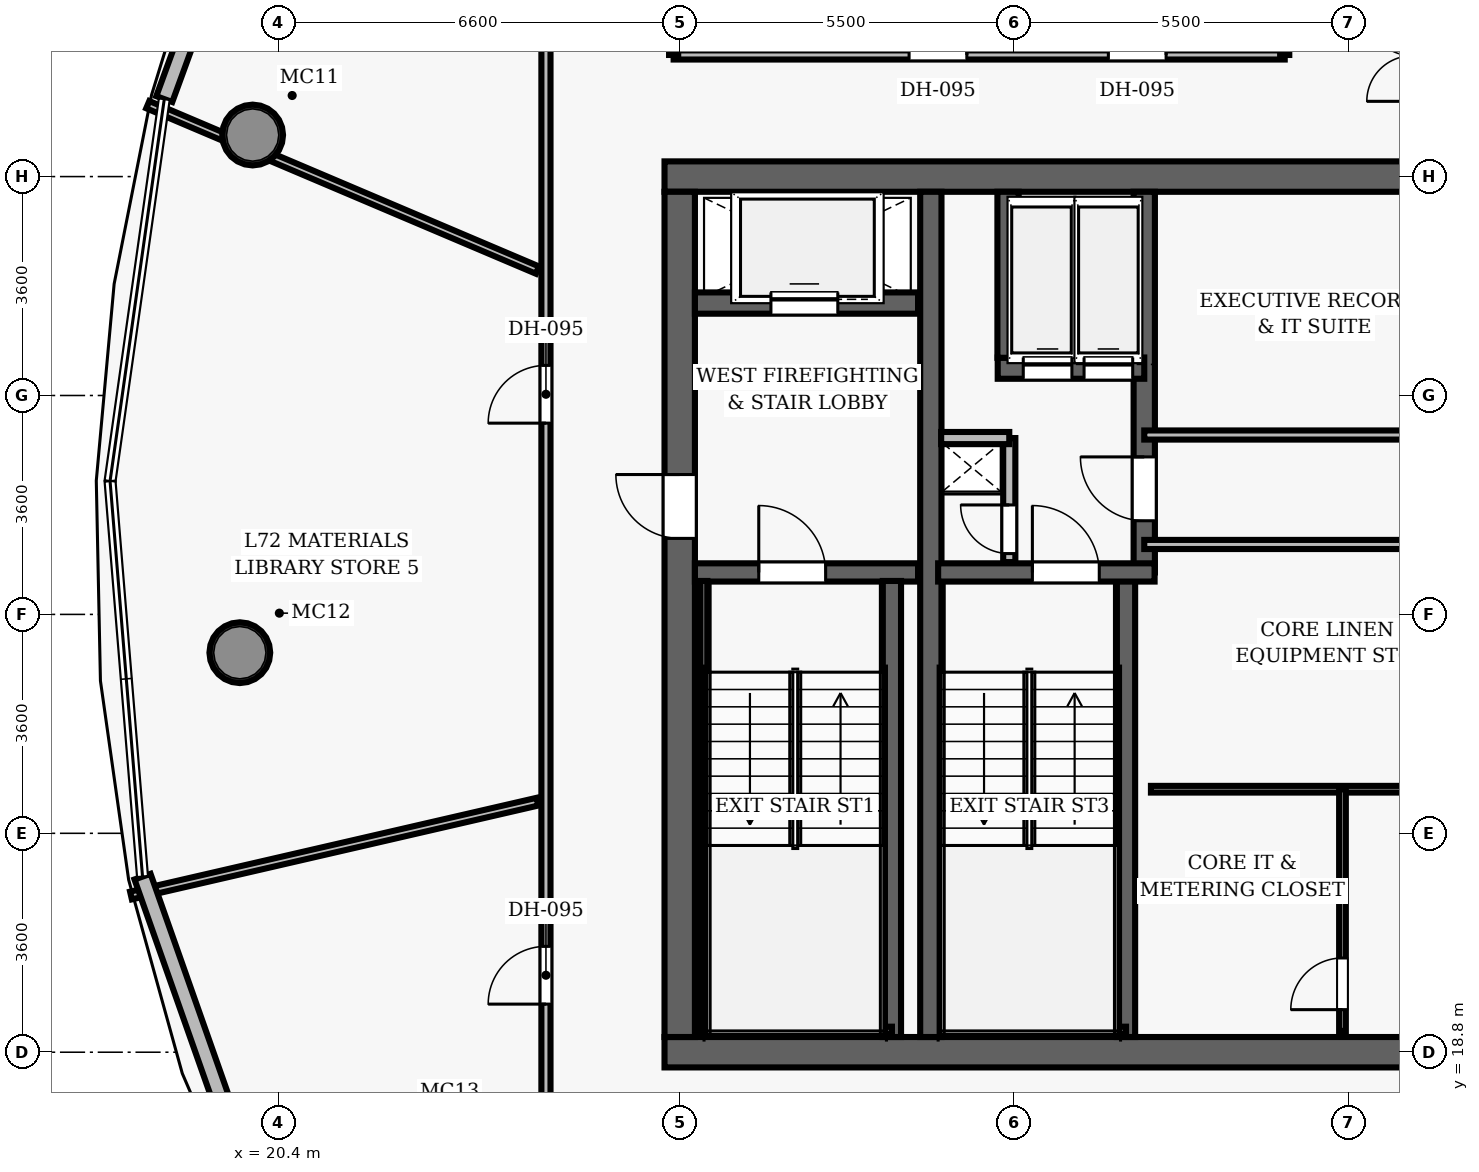
"""IFC4 building model, lengths in metres.
Left out: names, types, materials, properties, quantities, classifications, styles, units other than length and angle.
Written with IfcOpenShell. Run it as: python <this file> out.ifc"""

import sys

from ifc_helpers import new_model, si_unit, direction, frame, frame_2d, origin, origin_2d, place, context, subcontext, project, spatial, rectangle, hollow_circle, extrude, element, fill, save


model = new_model("IFC4")
c1 = context("Model", 3, precision=1e-05, world=origin(), true_north=direction((0.0, 1.0)))
c2 = subcontext(c1, "Body", "Model", "MODEL_VIEW")
j1 = project(units=[si_unit("LENGTHUNIT", "METRE"), si_unit("PLANEANGLEUNIT", "RADIAN")], contexts=[c1])
p1 = place(None, origin())
s1 = spatial("IfcSite", under=j1, at=p1, CompositionType="ELEMENT")
p2 = place(p1, origin())
s2 = spatial("IfcBuilding", under=s1, at=p2, CompositionType="ELEMENT")
p3 = place(p2, frame((0.0, 0.0, 284.4)))
s3 = spatial("IfcBuildingStorey", under=s2, at=p3, CompositionType="ELEMENT", Elevation=284.4)
p4 = place(p3, frame((26.75, 18.8, 0.0), z_axis=(0.0, 0.0, 1.0), x_axis=(1.0, 0.0, 0.0)))
e1 = element("IfcWall", 1, at=p4, inside=s3, PredefinedType="SHEAR", context=c2, shape_type="SweptSolid", body=[
    extrude(rectangle(XDim=22.5, YDim=0.5, at=frame_2d((11.25, 0.0))), origin(), (0.0, 0.0, 1.0), 3.85),
])
p5 = place(p4, frame((14.47, 0.0, 0.0)))
e2 = element("IfcOpeningElement", 2, at=p5, cuts=e1, PredefinedType="OPENING", context=c2, shape_type="SweptSolid", body=[
    extrude(rectangle(XDim=1.05, YDim=2.15, at=frame_2d((0.525, 1.075))), frame((0.0, 0.26, 0.0), z_axis=(0.0, -1.0, 0.0), x_axis=(1.0, 0.0, 0.0)), (0.0, 0.0, 1.0), 0.52),
])
p6 = place(p3, frame((26.75, 33.2, 0.0), z_axis=(0.0, 0.0, 1.0), x_axis=(1.0, 0.0, 0.0)))
e3 = element("IfcWall", 3, at=p6, inside=s3, PredefinedType="SHEAR", context=c2, shape_type="SweptSolid", body=[
    extrude(rectangle(XDim=22.5, YDim=0.5, at=frame_2d((11.25, 0.0))), origin(), (0.0, 0.0, 1.0), 3.85),
])
p7 = place(p3, frame((27.0, 19.05, 0.0), z_axis=(0.0, 0.0, 1.0), x_axis=(0.0, 1.0, 0.0)))
e4 = element("IfcWall", 4, at=p7, inside=s3, PredefinedType="SHEAR", context=c2, shape_type="SweptSolid", body=[
    extrude(rectangle(XDim=13.9, YDim=0.5, at=frame_2d((6.95, 0.0))), origin(), (0.0, 0.0, 1.0), 3.85),
])
p8 = place(p7, frame((8.2, 0.0, 0.0)))
e5 = element("IfcOpeningElement", 5, at=p8, cuts=e4, PredefinedType="OPENING", context=c2, shape_type="SweptSolid", body=[
    extrude(rectangle(XDim=1.05, YDim=2.15, at=frame_2d((0.525, 1.075))), frame((0.0, 0.26, 0.0), z_axis=(0.0, -1.0, 0.0), x_axis=(1.0, 0.0, 0.0)), (0.0, 0.0, 1.0), 0.52),
])
p9 = place(p3, frame((31.13, 19.05, 0.0), z_axis=(0.0, 0.0, 1.0), x_axis=(0.0, 1.0, 0.0)))
e6 = element("IfcWall", 6, at=p9, inside=s3, PredefinedType="SHEAR", context=c2, shape_type="SweptSolid", body=[
    extrude(rectangle(XDim=13.9, YDim=0.35, at=frame_2d((6.95, 0.0))), origin(), (0.0, 0.0, 1.0), 3.85),
])
for number, where, z_axis, x_axis in (
    (7, (19.976, 33.884, 0.0), (0.0, 0.0, 1.0), (1.0, 0.0, 0.0)),
    (8, (19.765, 25.371, 0.0), (0.0, 0.0, 1.0), (1.0, 0.0, 0.0)),
):
    element("IfcColumn", number, at=place(p3, frame(where, z_axis=z_axis, x_axis=x_axis)), inside=s3, PredefinedType="COLUMN", context=c2, shape_type="SweptSolid", body=[
        extrude(hollow_circle(Radius=0.5, WallThickness=0.045, at=origin_2d()), origin(), (0.0, 0.0, 1.0), 3.85),
    ])
p10 = place(p3, frame((27.25, 26.69, 0.0), z_axis=(0.0, 0.0, 1.0), x_axis=(1.0, 0.0, 0.0)))
e9 = element("IfcWall", 9, at=p10, inside=s3, PredefinedType="SHEAR", context=c2, shape_type="SweptSolid", body=[
    extrude(rectangle(XDim=3.67, YDim=0.3, at=frame_2d((1.835, 0.0))), origin(), (0.0, 0.0, 1.0), 3.85),
])
p11 = place(p10, frame((1.05, 0.0, 0.0)))
e10 = element("IfcOpeningElement", 10, at=p11, cuts=e9, PredefinedType="OPENING", context=c2, shape_type="SweptSolid", body=[
    extrude(rectangle(XDim=1.1, YDim=2.15, at=frame_2d((0.55, 1.075))), frame((0.0, 0.16, 0.0), z_axis=(0.0, -1.0, 0.0), x_axis=(1.0, 0.0, 0.0)), (0.0, 0.0, 1.0), 0.32),
])
p12 = place(p3, frame((30.49, 19.05, 0.0), z_axis=(0.0, 0.0, 1.0), x_axis=(0.0, 1.0, 0.0)))
e11 = element("IfcWall", 11, at=p12, inside=s3, PredefinedType="SHEAR", context=c2, shape_type="SweptSolid", body=[
    extrude(rectangle(XDim=7.5, YDim=0.3, at=frame_2d((3.75, 0.0))), origin(), (0.0, 0.0, 1.0), 3.85),
])
p13 = place(p3, frame((27.395, 19.1, 0.0), z_axis=(0.0, 0.0, 1.0), x_axis=(0.0, 1.0, 0.0)))
e12 = element("IfcWall", 12, at=p13, inside=s3, PredefinedType="SHEAR", context=c2, shape_type="SweptSolid", body=[
    extrude(rectangle(XDim=7.45, YDim=0.12, at=frame_2d((3.725, 0.0))), origin(), (0.0, 0.0, 1.0), 3.85),
])
p14 = place(p3, frame((27.395, 19.16, 0.0), z_axis=(0.0, 0.0, 1.0), x_axis=(1.0, 0.0, 0.0)))
e13 = element("IfcWall", 13, at=p14, inside=s3, PredefinedType="SHEAR", context=c2, shape_type="SweptSolid", body=[
    extrude(rectangle(XDim=3.095, YDim=0.12, at=frame_2d((1.547, 0.0))), origin(), (0.0, 0.0, 1.0), 3.85),
])
p15 = place(p3, frame((27.25, 31.12, 0.0), z_axis=(0.0, 0.0, 1.0), x_axis=(1.0, 0.0, 0.0)))
e14 = element("IfcWall", 14, at=p15, inside=s3, PredefinedType="SHEAR", context=c2, shape_type="SweptSolid", body=[
    extrude(rectangle(XDim=3.67, YDim=0.35, at=frame_2d((1.835, 0.0))), origin(), (0.0, 0.0, 1.0), 3.04),
])
p16 = place(p15, frame((1.25, 0.0, 0.0)))
e15 = element("IfcOpeningElement", 15, at=p16, cuts=e14, PredefinedType="OPENING", context=c2, shape_type="SweptSolid", body=[
    extrude(rectangle(XDim=1.1, YDim=2.15, at=frame_2d((0.55, 1.075))), frame((0.0, 0.185, 0.0), z_axis=(0.0, -1.0, 0.0), x_axis=(1.0, 0.0, 0.0)), (0.0, 0.0, 1.0), 0.37),
])
p17 = place(p3, frame((34.34, 19.05, 0.0), z_axis=(0.0, 0.0, 1.0), x_axis=(0.0, 1.0, 0.0)))
e16 = element("IfcWall", 16, at=p17, inside=s3, PredefinedType="SHEAR", context=c2, shape_type="SweptSolid", body=[
    extrude(rectangle(XDim=7.5, YDim=0.3, at=frame_2d((3.75, 0.0))), origin(), (0.0, 0.0, 1.0), 3.85),
])
p18 = place(p3, frame((34.64, 26.69, 0.0), z_axis=(0.0, 0.0, 1.0), x_axis=(0.0, 1.0, 0.0)))
e17 = element("IfcWall", 17, at=p18, inside=s3, PredefinedType="SHEAR", context=c2, shape_type="SweptSolid", body=[
    extrude(rectangle(XDim=6.26, YDim=0.35, at=frame_2d((3.13, 0.0))), origin(), (0.0, 0.0, 1.0), 3.85),
])
p19 = place(p18, frame((0.85, 0.0, 0.0)))
e18 = element("IfcOpeningElement", 18, at=p19, cuts=e17, PredefinedType="OPENING", context=c2, shape_type="SweptSolid", body=[
    extrude(rectangle(XDim=1.05, YDim=2.15, at=frame_2d((0.525, 1.075))), frame((0.0, 0.185, 0.0), z_axis=(0.0, -1.0, 0.0), x_axis=(1.0, 0.0, 0.0)), (0.0, 0.0, 1.0), 0.37),
])
p20 = place(p3, frame((31.25, 26.69, 0.0), z_axis=(0.0, 0.0, 1.0), x_axis=(1.0, 0.0, 0.0)))
e19 = element("IfcWall", 19, at=p20, inside=s3, PredefinedType="SHEAR", context=c2, shape_type="SweptSolid", body=[
    extrude(rectangle(XDim=3.56, YDim=0.3, at=frame_2d((1.78, 0.0))), origin(), (0.0, 0.0, 1.0), 3.85),
])
p21 = place(p20, frame((1.55, 0.0, 0.0)))
e20 = element("IfcOpeningElement", 20, at=p21, cuts=e19, PredefinedType="OPENING", context=c2, shape_type="SweptSolid", body=[
    extrude(rectangle(XDim=1.1, YDim=2.15, at=frame_2d((0.55, 1.075))), frame((0.0, 0.16, 0.0), z_axis=(0.0, -1.0, 0.0), x_axis=(1.0, 0.0, 0.0)), (0.0, 0.0, 1.0), 0.32),
])
p22 = place(p3, frame((31.3, 19.16, 0.0), z_axis=(0.0, 0.0, 1.0), x_axis=(1.0, 0.0, 0.0)))
e21 = element("IfcWall", 21, at=p22, inside=s3, PredefinedType="SHEAR", context=c2, shape_type="SweptSolid", body=[
    extrude(rectangle(XDim=3.04, YDim=0.12, at=frame_2d((1.52, 0.0))), origin(), (0.0, 0.0, 1.0), 3.85),
])
p23 = place(p3, frame((32.23, 30.05, 0.0), z_axis=(0.0, 0.0, 1.0), x_axis=(1.0, 0.0, 0.0)))
e22 = element("IfcWall", 22, at=p23, inside=s3, PredefinedType="SHEAR", context=c2, shape_type="SweptSolid", body=[
    extrude(rectangle(XDim=2.41, YDim=0.35, at=frame_2d((1.205, 0.0))), origin(), (0.0, 0.0, 1.0), 3.04),
])
p24 = place(p23, frame((0.42, 0.0, 0.0)))
e23 = element("IfcOpeningElement", 23, at=p24, cuts=e22, PredefinedType="OPENING", context=c2, shape_type="SweptSolid", body=[
    extrude(rectangle(XDim=0.8, YDim=2.15, at=frame_2d((0.4, 1.075))), frame((0.0, 0.185, 0.0), z_axis=(0.0, -1.0, 0.0), x_axis=(1.0, 0.0, 0.0)), (0.0, 0.0, 1.0), 0.37),
])
p25 = place(p23, frame((1.42, 0.0, 0.0)))
e24 = element("IfcOpeningElement", 24, at=p25, cuts=e22, PredefinedType="OPENING", context=c2, shape_type="SweptSolid", body=[
    extrude(rectangle(XDim=0.8, YDim=2.15, at=frame_2d((0.4, 1.075))), frame((0.0, 0.185, 0.0), z_axis=(0.0, -1.0, 0.0), x_axis=(1.0, 0.0, 0.0)), (0.0, 0.0, 1.0), 0.37),
])
p26 = place(p3, frame((32.4, 30.22, 0.0), z_axis=(0.0, 0.0, 1.0), x_axis=(0.0, 1.0, 0.0)))
e25 = element("IfcWall", 25, at=p26, inside=s3, PredefinedType="SHEAR", context=c2, shape_type="SweptSolid", body=[
    extrude(rectangle(XDim=2.73, YDim=0.35, at=frame_2d((1.365, 0.0))), origin(), (0.0, 0.0, 1.0), 3.04),
])
p27 = place(p3, frame((32.42, 26.86, 0.0), z_axis=(0.0, 0.0, 1.0), x_axis=(0.0, 1.0, 0.0)))
e26 = element("IfcWall", 26, at=p27, inside=s3, PredefinedType="PARTITIONING", context=c2, shape_type="SweptSolid", body=[
    extrude(rectangle(XDim=2.04, YDim=0.2, at=frame_2d((1.02, 0.0))), origin(), (0.0, 0.0, 1.0), 3.04),
])
p28 = place(p27, frame((0.14, 0.0, 0.0)))
e27 = element("IfcOpeningElement", 27, at=p28, cuts=e26, PredefinedType="OPENING", context=c2, shape_type="SweptSolid", body=[
    extrude(rectangle(XDim=0.8, YDim=2.05, at=frame_2d((0.4, 1.025))), frame((0.0, 0.11, 0.0), z_axis=(0.0, -1.0, 0.0), x_axis=(1.0, 0.0, 0.0)), (0.0, 0.0, 1.0), 0.22),
])
p29 = place(p3, frame((31.3, 28.9, 0.0), z_axis=(0.0, 0.0, 1.0), x_axis=(1.0, 0.0, 0.0)))
e28 = element("IfcWall", 28, at=p29, inside=s3, PredefinedType="PARTITIONING", context=c2, shape_type="SweptSolid", body=[
    extrude(rectangle(XDim=1.12, YDim=0.2, at=frame_2d((0.56, 0.0))), origin(), (0.0, 0.0, 1.0), 3.04),
])
for number, where, z_axis, x_axis in (
    (29, (34.64, 27.15, 0.0), (0.0, 0.0, 1.0), (1.0, 0.0, 0.0)),
    (30, (34.64, 28.95, 0.0), (0.0, 0.0, 1.0), (1.0, 0.0, 0.0)),
):
    element("IfcWall", number, at=place(p3, frame(where, z_axis=z_axis, x_axis=x_axis)), inside=s3, PredefinedType="PARTITIONING", context=c2, shape_type="SweptSolid", body=[
        extrude(rectangle(XDim=6.36, YDim=0.15, at=frame_2d((3.18, 0.0))), origin(), (0.0, 0.0, 1.0), 3.04),
    ])
p30 = place(p3, frame((34.75, 23.125, 0.0), z_axis=(0.0, 0.0, 1.0), x_axis=(1.0, 0.0, 0.0)))
e31 = element("IfcWall", 31, at=p30, inside=s3, PredefinedType="PARTITIONING", context=c2, shape_type="SweptSolid", body=[
    extrude(rectangle(XDim=6.25, YDim=0.11, at=frame_2d((3.125, 0.0))), origin(), (0.0, 0.0, 1.0), 3.04),
])
p31 = place(p3, frame((37.9, 19.15, 0.0), z_axis=(0.0, 0.0, 1.0), x_axis=(0.0, 1.0, 0.0)))
e32 = element("IfcWall", 32, at=p31, inside=s3, PredefinedType="PARTITIONING", context=c2, shape_type="SweptSolid", body=[
    extrude(rectangle(XDim=3.975, YDim=0.11, at=frame_2d((1.988, 0.0))), origin(), (0.0, 0.0, 1.0), 3.04),
])
p32 = place(p31, frame((0.35, 0.0, 0.0)))
e33 = element("IfcOpeningElement", 33, at=p32, cuts=e32, PredefinedType="OPENING", context=c2, shape_type="SweptSolid", body=[
    extrude(rectangle(XDim=0.85, YDim=2.1, at=frame_2d((0.425, 1.05))), frame((0.0, 0.065, 0.0), z_axis=(0.0, -1.0, 0.0), x_axis=(1.0, 0.0, 0.0)), (0.0, 0.0, 1.0), 0.13),
])
p33 = place(p3, frame((26.9, 35.2, 0.0), z_axis=(0.0, 0.0, 1.0), x_axis=(1.0, 0.0, 0.0)))
e34 = element("IfcWall", 34, at=p33, inside=s3, PredefinedType="PARTITIONING", context=c2, shape_type="SweptSolid", body=[
    extrude(rectangle(XDim=10.05, YDim=0.15, at=frame_2d((5.025, 0.0))), origin(), (0.0, 0.0, 1.0), 3.04),
])
p34 = place(p33, frame((7.149, 0.0, 0.0)))
e35 = element("IfcOpeningElement", 35, at=p34, cuts=e34, PredefinedType="OPENING", context=c2, shape_type="SweptSolid", body=[
    extrude(rectangle(XDim=0.95, YDim=2.15, at=frame_2d((0.475, 1.075))), frame((0.0, 0.085, 0.0), z_axis=(0.0, -1.0, 0.0), x_axis=(1.0, 0.0, 0.0)), (0.0, 0.0, 1.0), 0.17),
])
p35 = place(p33, frame((3.872, 0.0, 0.0)))
e36 = element("IfcOpeningElement", 36, at=p35, cuts=e34, PredefinedType="OPENING", context=c2, shape_type="SweptSolid", body=[
    extrude(rectangle(XDim=0.95, YDim=2.15, at=frame_2d((0.475, 1.075))), frame((0.0, 0.085, 0.0), z_axis=(0.0, -1.0, 0.0), x_axis=(1.0, 0.0, 0.0)), (0.0, 0.0, 1.0), 0.17),
])
p36 = place(p3, frame((24.8, 10.6, 0.0), z_axis=(0.0, 0.0, 1.0), x_axis=(0.0, 1.0, 0.0)))
e37 = element("IfcWall", 37, at=p36, inside=s3, PredefinedType="PARTITIONING", context=c2, shape_type="SweptSolid", body=[
    extrude(rectangle(XDim=30.8, YDim=0.15, at=frame_2d((15.4, 0.0))), origin(), (0.0, 0.0, 1.0), 3.04),
])
p37 = place(p36, frame((18.545, 0.0, 0.0)))
e38 = element("IfcOpeningElement", 38, at=p37, cuts=e37, PredefinedType="OPENING", context=c2, shape_type="SweptSolid", body=[
    extrude(rectangle(XDim=0.95, YDim=2.15, at=frame_2d((0.475, 1.075))), frame((0.0, 0.085, 0.0), z_axis=(0.0, -1.0, 0.0), x_axis=(1.0, 0.0, 0.0)), (0.0, 0.0, 1.0), 0.17),
])
p38 = place(p36, frame((8.991, 0.0, 0.0)))
e39 = element("IfcOpeningElement", 39, at=p38, cuts=e37, PredefinedType="OPENING", context=c2, shape_type="SweptSolid", body=[
    extrude(rectangle(XDim=0.95, YDim=2.15, at=frame_2d((0.475, 1.075))), frame((0.0, 0.085, 0.0), z_axis=(0.0, -1.0, 0.0), x_axis=(1.0, 0.0, 0.0)), (0.0, 0.0, 1.0), 0.17),
])
p39 = place(p3, frame((26.9, 35.2, 0.0), z_axis=(0.0, 0.0, 1.0), x_axis=(0.0, 1.0, 0.0)))
e40 = element("IfcWall", 40, at=p39, inside=s3, PredefinedType="PARTITIONING", context=c2, shape_type="SweptSolid", body=[
    extrude(rectangle(XDim=6.2, YDim=0.15, at=frame_2d((3.1, 0.0))), origin(), (0.0, 0.0, 1.0), 3.04),
])
p40 = place(p3, frame((36.95, 35.2, 0.0), z_axis=(0.0, 0.0, 1.0), x_axis=(0.0, 1.0, 0.0)))
e41 = element("IfcWall", 41, at=p40, inside=s3, PredefinedType="PARTITIONING", context=c2, shape_type="SweptSolid", body=[
    extrude(rectangle(XDim=5.2, YDim=0.15, at=frame_2d((2.6, 0.0))), origin(), (0.0, 0.0, 1.0), 3.04),
])
p41 = place(p3, frame((24.66, 31.663, 0.0), z_axis=(0.0, 0.0, 1.0), x_axis=(-0.920499996924, 0.390742569557, 0.0)))
e42 = element("IfcWall", 42, at=p41, inside=s3, PredefinedType="PARTITIONING", context=c2, shape_type="SweptSolid", body=[
    extrude(rectangle(XDim=6.962, YDim=0.13, at=frame_2d((3.481, 0.0))), origin(), (0.0, 0.0, 1.0), 3.04),
])
p42 = place(p3, frame((24.66, 22.92, 0.0), z_axis=(0.0, 0.0, 1.0), x_axis=(-0.974373199784, -0.224937474739, 0.0)))
e43 = element("IfcWall", 43, at=p42, inside=s3, PredefinedType="PARTITIONING", context=c2, shape_type="SweptSolid", body=[
    extrude(rectangle(XDim=6.861, YDim=0.13, at=frame_2d((3.43, 0.0))), origin(), (0.0, 0.0, 1.0), 3.04),
])
p43 = place(p3, frame((18.523, 34.474, 0.0), z_axis=(0.0, 0.0, 1.0), x_axis=(0.342960397208, 0.939349863441, 0.0)))
e44 = element("IfcWall", 44, at=p43, inside=s3, PredefinedType="SOLIDWALL", context=c2, shape_type="SweptSolid", body=[
    extrude(rectangle(XDim=5.86, YDim=0.28, at=frame_2d((2.93, 0.0))), origin(), (0.0, 0.0, 1.0), 3.625),
])
p44 = place(p3, frame((20.335, 15.532, 0.0), z_axis=(0.0, 0.0, 1.0), x_axis=(-0.33248553101, 0.943108356271, 0.0)))
e45 = element("IfcWall", 45, at=p44, inside=s3, PredefinedType="SOLIDWALL", context=c2, shape_type="SweptSolid", body=[
    extrude(rectangle(XDim=6.527, YDim=0.28, at=frame_2d((3.264, 0.0))), origin(), (0.0, 0.0, 1.0), 3.625),
])
p45 = place(p11, origin())
e46 = element("IfcDoor", 46, at=p45, inside=s3, OperationType="SINGLE_SWING_LEFT", PredefinedType="DOOR", context=c2, shape_type="SweptSolid", body=[
    extrude(rectangle(XDim=1.1, YDim=2.15, at=frame_2d((0.55, 1.075))), frame((0.0, 0.025, 0.0), z_axis=(0.0, -1.0, 0.0), x_axis=(1.0, 0.0, 0.0)), (0.0, 0.0, 1.0), 0.05),
])
fill(e10, e46)
p46 = place(p8, origin())
e47 = element("IfcDoor", 47, at=p46, inside=s3, OperationType="SINGLE_SWING_RIGHT", PredefinedType="DOOR", context=c2, shape_type="SweptSolid", body=[
    extrude(rectangle(XDim=1.05, YDim=2.15, at=frame_2d((0.525, 1.075))), frame((0.0, 0.025, 0.0), z_axis=(0.0, -1.0, 0.0), x_axis=(1.0, 0.0, 0.0)), (0.0, 0.0, 1.0), 0.05),
])
fill(e5, e47)
p47 = place(p21, origin())
e48 = element("IfcDoor", 48, at=p47, inside=s3, OperationType="SINGLE_SWING_LEFT", PredefinedType="DOOR", context=c2, shape_type="SweptSolid", body=[
    extrude(rectangle(XDim=1.1, YDim=2.15, at=frame_2d((0.55, 1.075))), frame((0.0, 0.025, 0.0), z_axis=(0.0, -1.0, 0.0), x_axis=(1.0, 0.0, 0.0)), (0.0, 0.0, 1.0), 0.05),
])
fill(e20, e48)
p48 = place(p28, origin())
e49 = element("IfcDoor", 49, at=p48, inside=s3, OperationType="SINGLE_SWING_RIGHT", PredefinedType="DOOR", context=c2, shape_type="SweptSolid", body=[
    extrude(rectangle(XDim=0.8, YDim=2.05, at=frame_2d((0.4, 1.025))), frame((0.0, 0.025, 0.0), z_axis=(0.0, -1.0, 0.0), x_axis=(1.0, 0.0, 0.0)), (0.0, 0.0, 1.0), 0.05),
])
fill(e27, e49)
p49 = place(p19, origin())
e50 = element("IfcDoor", 50, at=p49, inside=s3, OperationType="SINGLE_SWING_RIGHT", PredefinedType="DOOR", context=c2, shape_type="SweptSolid", body=[
    extrude(rectangle(XDim=1.05, YDim=2.15, at=frame_2d((0.525, 1.075))), frame((0.0, 0.025, 0.0), z_axis=(0.0, -1.0, 0.0), x_axis=(1.0, 0.0, 0.0)), (0.0, 0.0, 1.0), 0.05),
])
fill(e18, e50)
p50 = place(p32, origin())
e51 = element("IfcDoor", 51, at=p50, inside=s3, OperationType="SINGLE_SWING_LEFT", PredefinedType="DOOR", context=c2, shape_type="SweptSolid", body=[
    extrude(rectangle(XDim=0.85, YDim=2.1, at=frame_2d((0.425, 1.05))), frame((0.0, 0.025, 0.0), z_axis=(0.0, -1.0, 0.0), x_axis=(1.0, 0.0, 0.0)), (0.0, 0.0, 1.0), 0.05),
])
fill(e33, e51)
p51 = place(p34, origin())
e52 = element("IfcDoor", 52, at=p51, inside=s3, OperationType="SINGLE_SWING_RIGHT", PredefinedType="DOOR", context=c2, shape_type="SweptSolid", body=[
    extrude(rectangle(XDim=0.95, YDim=2.15, at=frame_2d((0.475, 1.075))), frame((0.0, 0.025, 0.0), z_axis=(0.0, -1.0, 0.0), x_axis=(1.0, 0.0, 0.0)), (0.0, 0.0, 1.0), 0.05),
])
fill(e35, e52)
p52 = place(p35, origin())
e53 = element("IfcDoor", 53, at=p52, inside=s3, OperationType="SINGLE_SWING_RIGHT", PredefinedType="DOOR", context=c2, shape_type="SweptSolid", body=[
    extrude(rectangle(XDim=0.95, YDim=2.15, at=frame_2d((0.475, 1.075))), frame((0.0, 0.025, 0.0), z_axis=(0.0, -1.0, 0.0), x_axis=(1.0, 0.0, 0.0)), (0.0, 0.0, 1.0), 0.05),
])
fill(e36, e53)
p53 = place(p37, origin())
e54 = element("IfcDoor", 54, at=p53, inside=s3, OperationType="SINGLE_SWING_LEFT", PredefinedType="DOOR", context=c2, shape_type="SweptSolid", body=[
    extrude(rectangle(XDim=0.95, YDim=2.15, at=frame_2d((0.475, 1.075))), frame((0.0, 0.025, 0.0), z_axis=(0.0, -1.0, 0.0), x_axis=(1.0, 0.0, 0.0)), (0.0, 0.0, 1.0), 0.05),
])
fill(e38, e54)
p54 = place(p38, origin())
e55 = element("IfcDoor", 55, at=p54, inside=s3, OperationType="SINGLE_SWING_LEFT", PredefinedType="DOOR", context=c2, shape_type="SweptSolid", body=[
    extrude(rectangle(XDim=0.95, YDim=2.15, at=frame_2d((0.475, 1.075))), frame((0.0, 0.025, 0.0), z_axis=(0.0, -1.0, 0.0), x_axis=(1.0, 0.0, 0.0)), (0.0, 0.0, 1.0), 0.05),
])
fill(e39, e55)
p55 = place(p16, origin())
e56 = element("IfcDoor", 56, at=p55, inside=s3, OperationType="SLIDING_TO_LEFT", PredefinedType="DOOR", context=c2, shape_type="SweptSolid", body=[
    extrude(rectangle(XDim=1.1, YDim=2.15, at=frame_2d((0.55, 1.075))), frame((0.0, 0.025, 0.0), z_axis=(0.0, -1.0, 0.0), x_axis=(1.0, 0.0, 0.0)), (0.0, 0.0, 1.0), 0.05),
])
fill(e15, e56)
p56 = place(p24, origin())
e57 = element("IfcDoor", 57, at=p56, inside=s3, OperationType="SLIDING_TO_LEFT", PredefinedType="DOOR", context=c2, shape_type="SweptSolid", body=[
    extrude(rectangle(XDim=0.8, YDim=2.15, at=frame_2d((0.4, 1.075))), frame((0.0, 0.025, 0.0), z_axis=(0.0, -1.0, 0.0), x_axis=(1.0, 0.0, 0.0)), (0.0, 0.0, 1.0), 0.05),
])
fill(e23, e57)
p57 = place(p25, origin())
e58 = element("IfcDoor", 58, at=p57, inside=s3, OperationType="SLIDING_TO_LEFT", PredefinedType="DOOR", context=c2, shape_type="SweptSolid", body=[
    extrude(rectangle(XDim=0.8, YDim=2.15, at=frame_2d((0.4, 1.075))), frame((0.0, 0.025, 0.0), z_axis=(0.0, -1.0, 0.0), x_axis=(1.0, 0.0, 0.0)), (0.0, 0.0, 1.0), 0.05),
])
fill(e24, e58)
save(model, sys.argv[1])
